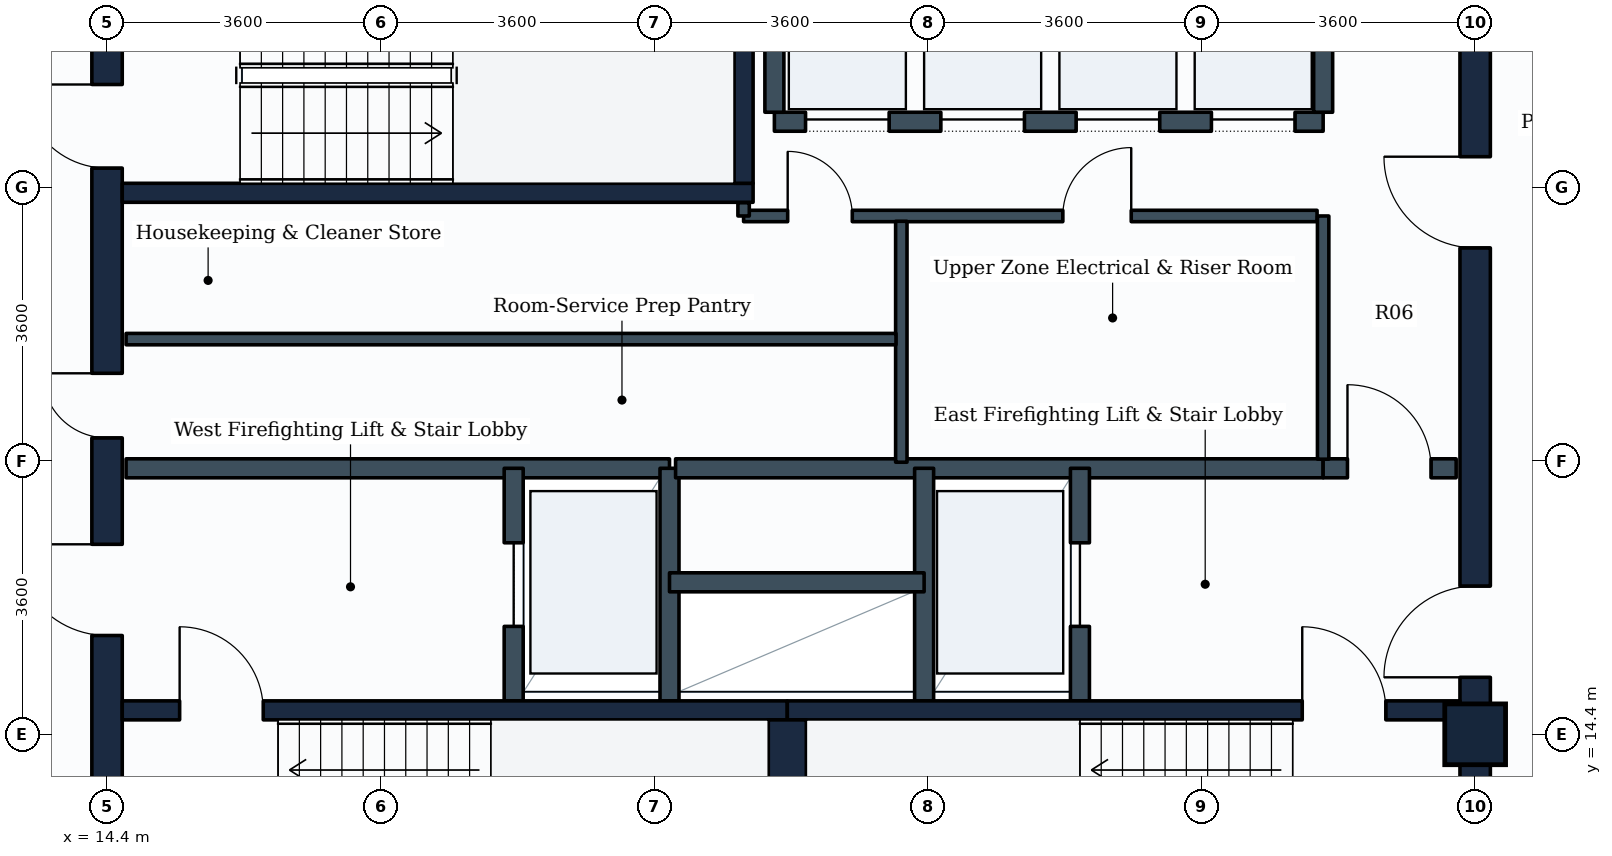
"""IFC4 building model, lengths in metres.
Left out: names, types, materials, properties, quantities, classifications, styles, units other than length and angle.
Written with IfcOpenShell. Run it as: python <this file> out.ifc"""

import sys

from ifc_helpers import new_model, si_unit, direction, frame, frame_2d, origin, origin_2d, place, context, subcontext, project, spatial, rectangle, extrude, element, fill, save


model = new_model("IFC4")
c1 = context("Model", 3, precision=1e-05, world=origin(), true_north=direction((0.0, 1.0)))
c2 = subcontext(c1, "Body", "Model", "MODEL_VIEW")
j1 = project(units=[si_unit("LENGTHUNIT", "METRE"), si_unit("PLANEANGLEUNIT", "RADIAN")], contexts=[c1])
p1 = place(None, origin())
s1 = spatial("IfcSite", under=j1, at=p1, CompositionType="ELEMENT")
p2 = place(p1, origin())
s2 = spatial("IfcBuilding", under=s1, at=p2, CompositionType="ELEMENT")
p3 = place(p2, frame((0.0, 0.0, 221.0)))
s3 = spatial("IfcBuildingStorey", under=s2, at=p3, CompositionType="ELEMENT", Elevation=221.0)
p4 = place(p3, frame((32.4, 14.4, 0.0), z_axis=(0.0, 0.0, 1.0), x_axis=(1.0, 0.0, 0.0)))
e1 = element("IfcColumn", 1, at=p4, inside=s3, PredefinedType="COLUMN", context=c2, shape_type="SweptSolid", body=[
    extrude(rectangle(XDim=0.8, YDim=0.8, at=origin_2d()), origin(), (0.0, 0.0, 1.0), 3.6),
])
p5 = place(p3, frame((14.4, 10.8, 0.0), z_axis=(0.0, 0.0, 1.0), x_axis=(0.0, 1.0, 0.0)))
e2 = element("IfcWall", 2, at=p5, inside=s3, PredefinedType="SHEAR", context=c2, shape_type="SweptSolid", body=[
    extrude(rectangle(XDim=14.4, YDim=0.4, at=frame_2d((7.2, 0.0))), origin(), (0.0, 0.0, 1.0), 3.35),
])
p6 = place(p5, frame((11.05, 0.0, 0.0)))
e3 = element("IfcOpeningElement", 3, at=p6, cuts=e2, PredefinedType="OPENING", context=c2, shape_type="SweptSolid", body=[
    extrude(rectangle(XDim=1.1, YDim=2.1, at=frame_2d((0.55, 1.05))), frame((0.0, 0.21, 0.0), z_axis=(0.0, -1.0, 0.0), x_axis=(1.0, 0.0, 0.0)), (0.0, 0.0, 1.0), 0.42),
])
p7 = place(p5, frame((4.9, 0.0, 0.0)))
e4 = element("IfcOpeningElement", 4, at=p7, cuts=e2, PredefinedType="OPENING", context=c2, shape_type="SweptSolid", body=[
    extrude(rectangle(XDim=1.2, YDim=2.1, at=frame_2d((0.6, 1.05))), frame((0.0, 0.21, 0.0), z_axis=(0.0, -1.0, 0.0), x_axis=(1.0, 0.0, 0.0)), (0.0, 0.0, 1.0), 0.42),
])
p8 = place(p5, frame((7.5, 0.0, 0.0)))
e5 = element("IfcOpeningElement", 5, at=p8, cuts=e2, PredefinedType="OPENING", context=c2, shape_type="SweptSolid", body=[
    extrude(rectangle(XDim=0.85, YDim=2.1, at=frame_2d((0.425, 1.05))), frame((0.0, 0.21, 0.0), z_axis=(0.0, -1.0, 0.0), x_axis=(1.0, 0.0, 0.0)), (0.0, 0.0, 1.0), 0.42),
])
p9 = place(p3, frame((32.4, 10.8, 0.0), z_axis=(0.0, 0.0, 1.0), x_axis=(0.0, 1.0, 0.0)))
e6 = element("IfcWall", 6, at=p9, inside=s3, PredefinedType="SHEAR", context=c2, shape_type="SweptSolid", body=[
    extrude(rectangle(XDim=14.4, YDim=0.4, at=frame_2d((7.2, 0.0))), origin(), (0.0, 0.0, 1.0), 3.35),
])
p10 = place(p9, frame((4.35, 0.0, 0.0)))
e7 = element("IfcOpeningElement", 7, at=p10, cuts=e6, PredefinedType="OPENING", context=c2, shape_type="SweptSolid", body=[
    extrude(rectangle(XDim=1.2, YDim=2.1, at=frame_2d((0.6, 1.05))), frame((0.0, 0.21, 0.0), z_axis=(0.0, -1.0, 0.0), x_axis=(1.0, 0.0, 0.0)), (0.0, 0.0, 1.0), 0.42),
])
p11 = place(p9, frame((10.0, 0.0, 0.0)))
e8 = element("IfcOpeningElement", 8, at=p11, cuts=e6, PredefinedType="OPENING", context=c2, shape_type="SweptSolid", body=[
    extrude(rectangle(XDim=1.2, YDim=2.1, at=frame_2d((0.6, 1.05))), frame((0.0, 0.21, 0.0), z_axis=(0.0, -1.0, 0.0), x_axis=(1.0, 0.0, 0.0)), (0.0, 0.0, 1.0), 0.42),
])
p12 = place(p3, frame((14.6, 14.715, 0.0), z_axis=(0.0, 0.0, 1.0), x_axis=(1.0, 0.0, 0.0)))
e9 = element("IfcWall", 9, at=p12, inside=s3, PredefinedType="SHEAR", context=c2, shape_type="SweptSolid", body=[
    extrude(rectangle(XDim=8.75, YDim=0.25, at=frame_2d((4.375, 0.0))), origin(), (0.0, 0.0, 1.0), 3.35),
])
p13 = place(p12, frame((0.755, 0.0, 0.0)))
e10 = element("IfcOpeningElement", 10, at=p13, cuts=e9, PredefinedType="OPENING", context=c2, shape_type="SweptSolid", body=[
    extrude(rectangle(XDim=1.1, YDim=2.1, at=frame_2d((0.55, 1.05))), frame((0.0, 0.135, 0.0), z_axis=(0.0, -1.0, 0.0), x_axis=(1.0, 0.0, 0.0)), (0.0, 0.0, 1.0), 0.27),
])
p14 = place(p3, frame((23.35, 14.715, 0.0), z_axis=(0.0, 0.0, 1.0), x_axis=(1.0, 0.0, 0.0)))
e11 = element("IfcWall", 11, at=p14, inside=s3, PredefinedType="SHEAR", context=c2, shape_type="SweptSolid", body=[
    extrude(rectangle(XDim=8.85, YDim=0.25, at=frame_2d((4.425, 0.0))), origin(), (0.0, 0.0, 1.0), 3.35),
])
p15 = place(p14, frame((6.775, 0.0, 0.0)))
e12 = element("IfcOpeningElement", 12, at=p15, cuts=e11, PredefinedType="OPENING", context=c2, shape_type="SweptSolid", body=[
    extrude(rectangle(XDim=1.1, YDim=2.1, at=frame_2d((0.55, 1.05))), frame((0.0, 0.135, 0.0), z_axis=(0.0, -1.0, 0.0), x_axis=(1.0, 0.0, 0.0)), (0.0, 0.0, 1.0), 0.27),
])
p16 = place(p3, frame((23.35, 11.75, 0.0), z_axis=(0.0, 0.0, 1.0), x_axis=(0.0, 1.0, 0.0)))
e13 = element("IfcWall", 13, at=p16, inside=s3, PredefinedType="SHEAR", context=c2, shape_type="SweptSolid", body=[
    extrude(rectangle(XDim=2.84, YDim=0.5, at=frame_2d((1.42, 0.0))), origin(), (0.0, 0.0, 1.0), 3.35),
])
p17 = place(p3, frame((14.6, 21.525, 0.0), z_axis=(0.0, 0.0, 1.0), x_axis=(1.0, 0.0, 0.0)))
e14 = element("IfcWall", 14, at=p17, inside=s3, PredefinedType="SHEAR", context=c2, shape_type="SweptSolid", body=[
    extrude(rectangle(XDim=8.3, YDim=0.25, at=frame_2d((4.15, 0.0))), origin(), (0.0, 0.0, 1.0), 3.35),
])
p18 = place(p3, frame((22.775, 21.65, 0.0), z_axis=(0.0, 0.0, 1.0), x_axis=(0.0, 1.0, 0.0)))
e15 = element("IfcWall", 15, at=p18, inside=s3, PredefinedType="SHEAR", context=c2, shape_type="SweptSolid", body=[
    extrude(rectangle(XDim=2.84, YDim=0.25, at=frame_2d((1.42, 0.0))), origin(), (0.0, 0.0, 1.0), 3.35),
])
p19 = place(p3, frame((14.65, 17.9, 0.0), z_axis=(0.0, 0.0, 1.0), x_axis=(1.0, 0.0, 0.0)))
e16 = element("IfcWall", 16, at=p19, inside=s3, PredefinedType="PARTITIONING", context=c2, shape_type="SweptSolid", body=[
    extrude(rectangle(XDim=7.15, YDim=0.25, at=frame_2d((3.575, 0.0))), origin(), (0.0, 0.0, 1.0), 3.335),
])
p20 = place(p3, frame((19.75, 14.84, 0.0), z_axis=(0.0, 0.0, 1.0), x_axis=(0.0, 1.0, 0.0)))
e17 = element("IfcWall", 17, at=p20, inside=s3, PredefinedType="PARTITIONING", context=c2, shape_type="SweptSolid", body=[
    extrude(rectangle(XDim=3.06, YDim=0.25, at=frame_2d((1.53, 0.0))), origin(), (0.0, 0.0, 1.0), 3.335),
])
p21 = place(p20, frame((0.98, 0.0, 0.0)))
e18 = element("IfcOpeningElement", 18, at=p21, cuts=e17, PredefinedType="OPENING", context=c2, shape_type="SweptSolid", body=[
    extrude(rectangle(XDim=1.1, YDim=2.1, at=frame_2d((0.55, 1.05))), frame((0.0, 0.135, 0.0), z_axis=(0.0, -1.0, 0.0), x_axis=(1.0, 0.0, 0.0)), (0.0, 0.0, 1.0), 0.27),
])
p22 = place(p3, frame((21.8, 14.84, 0.0), z_axis=(0.0, 0.0, 1.0), x_axis=(0.0, 1.0, 0.0)))
e19 = element("IfcWall", 19, at=p22, inside=s3, PredefinedType="PARTITIONING", context=c2, shape_type="SweptSolid", body=[
    extrude(rectangle(XDim=3.06, YDim=0.25, at=frame_2d((1.53, 0.0))), origin(), (0.0, 0.0, 1.0), 3.335),
])
p23 = place(p3, frame((21.88, 17.9, 0.0), z_axis=(0.0, 0.0, 1.0), x_axis=(1.0, 0.0, 0.0)))
e20 = element("IfcWall", 20, at=p23, inside=s3, PredefinedType="PARTITIONING", context=c2, shape_type="SweptSolid", body=[
    extrude(rectangle(XDim=8.52, YDim=0.25, at=frame_2d((4.26, 0.0))), origin(), (0.0, 0.0, 1.0), 3.335),
])
p24 = place(p3, frame((30.4, 17.9, 0.0), z_axis=(0.0, 0.0, 1.0), x_axis=(1.0, 0.0, 0.0)))
e21 = element("IfcWall", 21, at=p24, inside=s3, PredefinedType="PARTITIONING", context=c2, shape_type="SweptSolid", body=[
    extrude(rectangle(XDim=1.75, YDim=0.25, at=frame_2d((0.875, 0.0))), origin(), (0.0, 0.0, 1.0), 3.335),
])
p25 = place(p24, frame((0.32, 0.0, 0.0)))
e22 = element("IfcOpeningElement", 22, at=p25, cuts=e21, PredefinedType="OPENING", context=c2, shape_type="SweptSolid", body=[
    extrude(rectangle(XDim=1.1, YDim=2.1, at=frame_2d((0.55, 1.05))), frame((0.0, 0.135, 0.0), z_axis=(0.0, -1.0, 0.0), x_axis=(1.0, 0.0, 0.0)), (0.0, 0.0, 1.0), 0.27),
])
p26 = place(p3, frame((25.15, 14.84, 0.0), z_axis=(0.0, 0.0, 1.0), x_axis=(0.0, 1.0, 0.0)))
e23 = element("IfcWall", 23, at=p26, inside=s3, PredefinedType="PARTITIONING", context=c2, shape_type="SweptSolid", body=[
    extrude(rectangle(XDim=3.06, YDim=0.25, at=frame_2d((1.53, 0.0))), origin(), (0.0, 0.0, 1.0), 3.335),
])
p27 = place(p3, frame((27.2, 14.84, 0.0), z_axis=(0.0, 0.0, 1.0), x_axis=(0.0, 1.0, 0.0)))
e24 = element("IfcWall", 24, at=p27, inside=s3, PredefinedType="PARTITIONING", context=c2, shape_type="SweptSolid", body=[
    extrude(rectangle(XDim=3.06, YDim=0.25, at=frame_2d((1.53, 0.0))), origin(), (0.0, 0.0, 1.0), 3.335),
])
p28 = place(p27, frame((0.98, 0.0, 0.0)))
e25 = element("IfcOpeningElement", 25, at=p28, cuts=e24, PredefinedType="OPENING", context=c2, shape_type="SweptSolid", body=[
    extrude(rectangle(XDim=1.1, YDim=2.1, at=frame_2d((0.55, 1.05))), frame((0.0, 0.135, 0.0), z_axis=(0.0, -1.0, 0.0), x_axis=(1.0, 0.0, 0.0)), (0.0, 0.0, 1.0), 0.27),
])
p29 = place(p3, frame((21.8, 16.4, 0.0), z_axis=(0.0, 0.0, 1.0), x_axis=(1.0, 0.0, 0.0)))
e26 = element("IfcWall", 26, at=p29, inside=s3, PredefinedType="PARTITIONING", context=c2, shape_type="SweptSolid", body=[
    extrude(rectangle(XDim=3.35, YDim=0.25, at=frame_2d((1.675, 0.0))), origin(), (0.0, 0.0, 1.0), 3.335),
])
p30 = place(p3, frame((23.18, 22.46, 0.0), z_axis=(0.0, 0.0, 1.0), x_axis=(1.0, 0.0, 0.0)))
e27 = element("IfcWall", 27, at=p30, inside=s3, PredefinedType="PARTITIONING", context=c2, shape_type="SweptSolid", body=[
    extrude(rectangle(XDim=7.22, YDim=0.25, at=frame_2d((3.61, 0.0))), origin(), (0.0, 0.0, 1.0), 3.335),
])
p31 = place(p30, frame((0.41, 0.0, 0.0)))
e28 = element("IfcOpeningElement", 28, at=p31, cuts=e27, PredefinedType="OPENING", context=c2, shape_type="SweptSolid", body=[
    extrude(rectangle(XDim=1.1, YDim=2.1, at=frame_2d((0.55, 1.05))), frame((0.0, 0.135, 0.0), z_axis=(0.0, -1.0, 0.0), x_axis=(1.0, 0.0, 0.0)), (0.0, 0.0, 1.0), 0.27),
])
p32 = place(p30, frame((2.19, 0.0, 0.0)))
e29 = element("IfcOpeningElement", 29, at=p32, cuts=e27, PredefinedType="OPENING", context=c2, shape_type="SweptSolid", body=[
    extrude(rectangle(XDim=1.1, YDim=2.1, at=frame_2d((0.55, 1.05))), frame((0.0, 0.135, 0.0), z_axis=(0.0, -1.0, 0.0), x_axis=(1.0, 0.0, 0.0)), (0.0, 0.0, 1.0), 0.27),
])
p33 = place(p30, frame((3.97, 0.0, 0.0)))
e30 = element("IfcOpeningElement", 30, at=p33, cuts=e27, PredefinedType="OPENING", context=c2, shape_type="SweptSolid", body=[
    extrude(rectangle(XDim=1.1, YDim=2.1, at=frame_2d((0.55, 1.05))), frame((0.0, 0.135, 0.0), z_axis=(0.0, -1.0, 0.0), x_axis=(1.0, 0.0, 0.0)), (0.0, 0.0, 1.0), 0.27),
])
p34 = place(p30, frame((5.75, 0.0, 0.0)))
e31 = element("IfcOpeningElement", 31, at=p34, cuts=e27, PredefinedType="OPENING", context=c2, shape_type="SweptSolid", body=[
    extrude(rectangle(XDim=1.1, YDim=2.1, at=frame_2d((0.55, 1.05))), frame((0.0, 0.135, 0.0), z_axis=(0.0, -1.0, 0.0), x_axis=(1.0, 0.0, 0.0)), (0.0, 0.0, 1.0), 0.27),
])
for number, where, z_axis, x_axis in (
    (32, (23.18, 22.585, 0.0), (0.0, 0.0, 1.0), (0.0, 1.0, 0.0)),
    (33, (30.4, 22.585, 0.0), (0.0, 0.0, 1.0), (0.0, 1.0, 0.0)),
):
    element("IfcWall", number, at=place(p3, frame(where, z_axis=z_axis, x_axis=x_axis)), inside=s3, PredefinedType="PARTITIONING", context=c2, shape_type="SweptSolid", body=[
        extrude(rectangle(XDim=2.315, YDim=0.25, at=frame_2d((1.157, 0.0))), origin(), (0.0, 0.0, 1.0), 3.335),
    ])
p35 = place(p3, frame((22.775, 21.22, 0.0), z_axis=(0.0, 0.0, 1.0), x_axis=(1.0, 0.0, 0.0)))
e34 = element("IfcWall", 34, at=p35, inside=s3, PredefinedType="PARTITIONING", context=c2, shape_type="SweptSolid", body=[
    extrude(rectangle(XDim=7.545, YDim=0.15, at=frame_2d((3.772, 0.0))), origin(), (0.0, 0.0, 1.0), 3.335),
])
p36 = place(p35, frame((0.58, 0.0, 0.0)))
e35 = element("IfcOpeningElement", 35, at=p36, cuts=e34, PredefinedType="OPENING", context=c2, shape_type="SweptSolid", body=[
    extrude(rectangle(XDim=0.85, YDim=2.1, at=frame_2d((0.425, 1.05))), frame((0.0, 0.085, 0.0), z_axis=(0.0, -1.0, 0.0), x_axis=(1.0, 0.0, 0.0)), (0.0, 0.0, 1.0), 0.17),
])
p37 = place(p35, frame((4.2, 0.0, 0.0)))
e36 = element("IfcOpeningElement", 36, at=p37, cuts=e34, PredefinedType="OPENING", context=c2, shape_type="SweptSolid", body=[
    extrude(rectangle(XDim=0.9, YDim=2.1, at=frame_2d((0.45, 1.05))), frame((0.0, 0.085, 0.0), z_axis=(0.0, -1.0, 0.0), x_axis=(1.0, 0.0, 0.0)), (0.0, 0.0, 1.0), 0.17),
])
p38 = place(p3, frame((22.775, 21.22, 0.0), z_axis=(0.0, 0.0, 1.0), x_axis=(0.0, 1.0, 0.0)))
e37 = element("IfcWall", 37, at=p38, inside=s3, PredefinedType="PARTITIONING", context=c2, shape_type="SweptSolid", body=[
    extrude(rectangle(XDim=0.175, YDim=0.15, at=frame_2d((0.087, 0.0))), origin(), (0.0, 0.0, 1.0), 3.335),
])
p39 = place(p3, frame((30.4, 18.02, 0.0), z_axis=(0.0, 0.0, 1.0), x_axis=(0.0, 1.0, 0.0)))
e38 = element("IfcWall", 38, at=p39, inside=s3, PredefinedType="PARTITIONING", context=c2, shape_type="SweptSolid", body=[
    extrude(rectangle(XDim=3.2, YDim=0.15, at=frame_2d((1.6, 0.0))), origin(), (0.0, 0.0, 1.0), 3.335),
])
p40 = place(p3, frame((24.85, 17.98, 0.0), z_axis=(0.0, 0.0, 1.0), x_axis=(0.0, 1.0, 0.0)))
e39 = element("IfcWall", 39, at=p40, inside=s3, PredefinedType="PARTITIONING", context=c2, shape_type="SweptSolid", body=[
    extrude(rectangle(XDim=3.17, YDim=0.15, at=frame_2d((1.585, 0.0))), origin(), (0.0, 0.0, 1.0), 3.335),
])
p41 = place(p3, frame((14.65, 19.6, 0.0), z_axis=(0.0, 0.0, 1.0), x_axis=(1.0, 0.0, 0.0)))
e40 = element("IfcWall", 40, at=p41, inside=s3, PredefinedType="PARTITIONING", context=c2, shape_type="SweptSolid", body=[
    extrude(rectangle(XDim=10.13, YDim=0.15, at=frame_2d((5.065, 0.0))), origin(), (0.0, 0.0, 1.0), 3.335),
])
p42 = place(p13, origin())
e41 = element("IfcDoor", 41, at=p42, inside=s3, OperationType="SINGLE_SWING_LEFT", PredefinedType="DOOR", context=c2, shape_type="SweptSolid", body=[
    extrude(rectangle(XDim=1.1, YDim=2.1, at=frame_2d((0.55, 1.05))), frame((0.0, 0.025, 0.0), z_axis=(0.0, -1.0, 0.0), x_axis=(1.0, 0.0, 0.0)), (0.0, 0.0, 1.0), 0.05),
])
fill(e10, e41)
p43 = place(p15, origin())
e42 = element("IfcDoor", 42, at=p43, inside=s3, OperationType="SINGLE_SWING_LEFT", PredefinedType="DOOR", context=c2, shape_type="SweptSolid", body=[
    extrude(rectangle(XDim=1.1, YDim=2.1, at=frame_2d((0.55, 1.05))), frame((0.0, 0.025, 0.0), z_axis=(0.0, -1.0, 0.0), x_axis=(1.0, 0.0, 0.0)), (0.0, 0.0, 1.0), 0.05),
])
fill(e12, e42)
p44 = place(p6, origin())
e43 = element("IfcDoor", 43, at=p44, inside=s3, OperationType="SINGLE_SWING_RIGHT", PredefinedType="DOOR", context=c2, shape_type="SweptSolid", body=[
    extrude(rectangle(XDim=1.1, YDim=2.1, at=frame_2d((0.55, 1.05))), frame((0.0, 0.025, 0.0), z_axis=(0.0, -1.0, 0.0), x_axis=(1.0, 0.0, 0.0)), (0.0, 0.0, 1.0), 0.05),
])
fill(e3, e43)
p45 = place(p21, origin())
e44 = element("IfcDoor", 44, at=p45, inside=s3, OperationType="SLIDING_TO_LEFT", PredefinedType="DOOR", context=c2, shape_type="SweptSolid", body=[
    extrude(rectangle(XDim=1.1, YDim=2.1, at=frame_2d((0.55, 1.05))), frame((0.0, 0.025, 0.0), z_axis=(0.0, -1.0, 0.0), x_axis=(1.0, 0.0, 0.0)), (0.0, 0.0, 1.0), 0.05),
])
fill(e18, e44)
p46 = place(p28, origin())
e45 = element("IfcDoor", 45, at=p46, inside=s3, OperationType="SLIDING_TO_LEFT", PredefinedType="DOOR", context=c2, shape_type="SweptSolid", body=[
    extrude(rectangle(XDim=1.1, YDim=2.1, at=frame_2d((0.55, 1.05))), frame((0.0, 0.025, 0.0), z_axis=(0.0, -1.0, 0.0), x_axis=(1.0, 0.0, 0.0)), (0.0, 0.0, 1.0), 0.05),
])
fill(e25, e45)
p47 = place(p7, origin())
e46 = element("IfcDoor", 46, at=p47, inside=s3, OperationType="SINGLE_SWING_RIGHT", PredefinedType="DOOR", context=c2, shape_type="SweptSolid", body=[
    extrude(rectangle(XDim=1.2, YDim=2.1, at=frame_2d((0.6, 1.05))), frame((0.0, 0.025, 0.0), z_axis=(0.0, -1.0, 0.0), x_axis=(1.0, 0.0, 0.0)), (0.0, 0.0, 1.0), 0.05),
])
fill(e4, e46)
p48 = place(p10, origin())
e47 = element("IfcDoor", 47, at=p48, inside=s3, OperationType="SINGLE_SWING_LEFT", PredefinedType="DOOR", context=c2, shape_type="SweptSolid", body=[
    extrude(rectangle(XDim=1.2, YDim=2.1, at=frame_2d((0.6, 1.05))), frame((0.0, 0.025, 0.0), z_axis=(0.0, -1.0, 0.0), x_axis=(1.0, 0.0, 0.0)), (0.0, 0.0, 1.0), 0.05),
])
fill(e7, e47)
p49 = place(p25, origin())
e48 = element("IfcDoor", 48, at=p49, inside=s3, OperationType="SINGLE_SWING_LEFT", PredefinedType="DOOR", context=c2, shape_type="SweptSolid", body=[
    extrude(rectangle(XDim=1.1, YDim=2.1, at=frame_2d((0.55, 1.05))), frame((0.0, 0.025, 0.0), z_axis=(0.0, -1.0, 0.0), x_axis=(1.0, 0.0, 0.0)), (0.0, 0.0, 1.0), 0.05),
])
fill(e22, e48)
p50 = place(p31, origin())
e49 = element("IfcDoor", 49, at=p50, inside=s3, OperationType="SLIDING_TO_LEFT", PredefinedType="DOOR", context=c2, shape_type="SweptSolid", body=[
    extrude(rectangle(XDim=1.1, YDim=2.1, at=frame_2d((0.55, 1.05))), frame((0.0, 0.025, 0.0), z_axis=(0.0, -1.0, 0.0), x_axis=(1.0, 0.0, 0.0)), (0.0, 0.0, 1.0), 0.05),
])
fill(e28, e49)
p51 = place(p32, origin())
e50 = element("IfcDoor", 50, at=p51, inside=s3, OperationType="SLIDING_TO_LEFT", PredefinedType="DOOR", context=c2, shape_type="SweptSolid", body=[
    extrude(rectangle(XDim=1.1, YDim=2.1, at=frame_2d((0.55, 1.05))), frame((0.0, 0.025, 0.0), z_axis=(0.0, -1.0, 0.0), x_axis=(1.0, 0.0, 0.0)), (0.0, 0.0, 1.0), 0.05),
])
fill(e29, e50)
p52 = place(p33, origin())
e51 = element("IfcDoor", 51, at=p52, inside=s3, OperationType="SLIDING_TO_LEFT", PredefinedType="DOOR", context=c2, shape_type="SweptSolid", body=[
    extrude(rectangle(XDim=1.1, YDim=2.1, at=frame_2d((0.55, 1.05))), frame((0.0, 0.025, 0.0), z_axis=(0.0, -1.0, 0.0), x_axis=(1.0, 0.0, 0.0)), (0.0, 0.0, 1.0), 0.05),
])
fill(e30, e51)
p53 = place(p34, origin())
e52 = element("IfcDoor", 52, at=p53, inside=s3, OperationType="SLIDING_TO_LEFT", PredefinedType="DOOR", context=c2, shape_type="SweptSolid", body=[
    extrude(rectangle(XDim=1.1, YDim=2.1, at=frame_2d((0.55, 1.05))), frame((0.0, 0.025, 0.0), z_axis=(0.0, -1.0, 0.0), x_axis=(1.0, 0.0, 0.0)), (0.0, 0.0, 1.0), 0.05),
])
fill(e31, e52)
p54 = place(p11, origin())
e53 = element("IfcDoor", 53, at=p54, inside=s3, OperationType="SINGLE_SWING_RIGHT", PredefinedType="DOOR", context=c2, shape_type="SweptSolid", body=[
    extrude(rectangle(XDim=1.2, YDim=2.1, at=frame_2d((0.6, 1.05))), frame((0.0, 0.025, 0.0), z_axis=(0.0, -1.0, 0.0), x_axis=(1.0, 0.0, 0.0)), (0.0, 0.0, 1.0), 0.05),
])
fill(e8, e53)
p55 = place(p8, origin())
e54 = element("IfcDoor", 54, at=p55, inside=s3, OperationType="SINGLE_SWING_RIGHT", PredefinedType="DOOR", context=c2, shape_type="SweptSolid", body=[
    extrude(rectangle(XDim=0.85, YDim=2.1, at=frame_2d((0.425, 1.05))), frame((0.0, 0.025, 0.0), z_axis=(0.0, -1.0, 0.0), x_axis=(1.0, 0.0, 0.0)), (0.0, 0.0, 1.0), 0.05),
])
fill(e5, e54)
p56 = place(p36, origin())
e55 = element("IfcDoor", 55, at=p56, inside=s3, OperationType="SINGLE_SWING_LEFT", PredefinedType="DOOR", context=c2, shape_type="SweptSolid", body=[
    extrude(rectangle(XDim=0.85, YDim=2.1, at=frame_2d((0.425, 1.05))), frame((0.0, 0.025, 0.0), z_axis=(0.0, -1.0, 0.0), x_axis=(1.0, 0.0, 0.0)), (0.0, 0.0, 1.0), 0.05),
])
fill(e35, e55)
p57 = place(p37, origin())
e56 = element("IfcDoor", 56, at=p57, inside=s3, OperationType="SINGLE_SWING_RIGHT", PredefinedType="DOOR", context=c2, shape_type="SweptSolid", body=[
    extrude(rectangle(XDim=0.9, YDim=2.1, at=frame_2d((0.45, 1.05))), frame((0.0, 0.025, 0.0), z_axis=(0.0, -1.0, 0.0), x_axis=(1.0, 0.0, 0.0)), (0.0, 0.0, 1.0), 0.05),
])
fill(e36, e56)
save(model, sys.argv[1])
